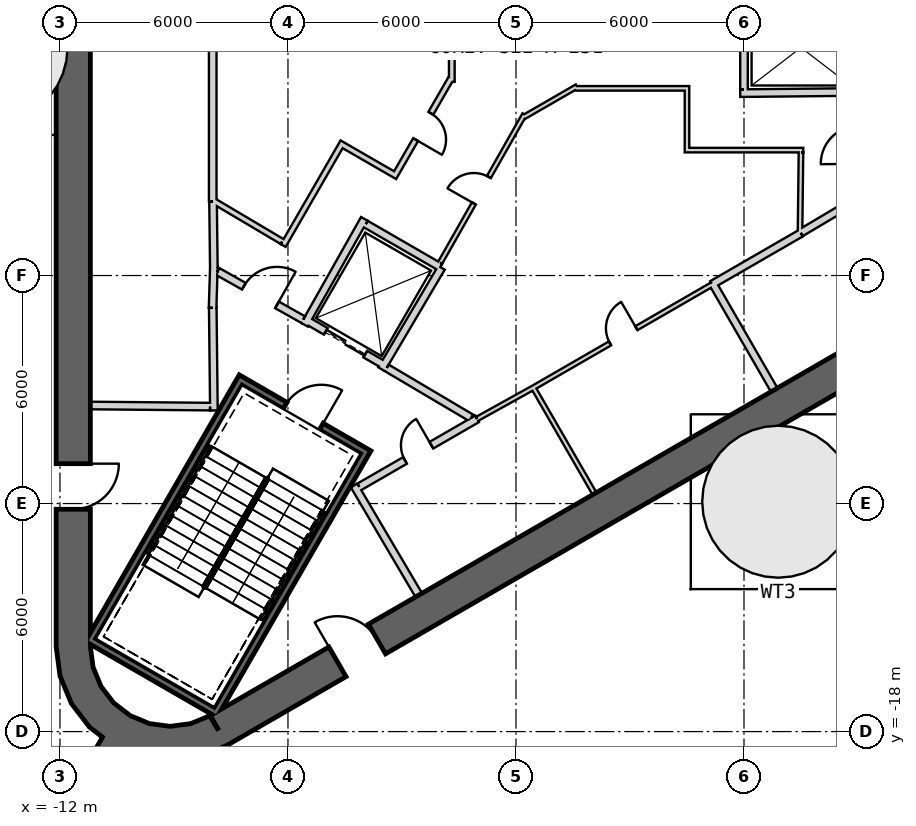
"""IFC4 building model, lengths in metres.
Left out: names, types, materials, properties, quantities, classifications, styles, units other than length and angle.
Written with IfcOpenShell. Run it as: python <this file> out.ifc"""

import sys

from ifc_helpers import new_model, si_unit, direction, frame, frame_2d, origin, place, context, subcontext, project, spatial, polyline, rectangle, outline, extrude, element, fill, save


model = new_model("IFC4")
c1 = context("Model", 3, precision=1e-05, world=origin(), true_north=direction((0.0, 1.0)))
c2 = subcontext(c1, "Body", "Model", "MODEL_VIEW")
j1 = project(units=[si_unit("LENGTHUNIT", "METRE"), si_unit("PLANEANGLEUNIT", "RADIAN")], contexts=[c1])
p1 = place(None, origin())
s1 = spatial("IfcSite", under=j1, at=p1, CompositionType="ELEMENT")
p2 = place(p1, origin())
s2 = spatial("IfcBuilding", under=s1, at=p2, CompositionType="ELEMENT")
p3 = place(p2, frame((0.0, 0.0, 283.7)))
s3 = spatial("IfcBuildingStorey", under=s2, at=p3, CompositionType="ELEMENT", Elevation=283.7)
p4 = place(p3, frame((-11.65, 15.762, 0.0), z_axis=(0.0, 0.0, 1.0), x_axis=(0.0, -1.0, 0.0)))
e1 = element("IfcWall", 1, at=p4, inside=s3, PredefinedType="SHEAR", context=c2, shape_type="SweptSolid", body=[
    extrude(rectangle(XDim=31.523, YDim=0.9, at=frame_2d((15.762, 0.0))), origin(), (0.0, 0.0, 1.0), 9.0),
])
p5 = place(p4, frame((3.612, 0.0, 0.0)))
e2 = element("IfcOpeningElement", 2, at=p5, cuts=e1, PredefinedType="OPENING", context=c2, shape_type="SweptSolid", body=[
    extrude(rectangle(XDim=1.2, YDim=2.4, at=frame_2d((0.6, 1.2))), frame((0.0, 0.46, 0.0), z_axis=(0.0, -1.0, 0.0), x_axis=(1.0, 0.0, 0.0)), (0.0, 0.0, 1.0), 0.92),
])
p6 = place(p4, frame((26.712, 0.0, 0.0)))
e3 = element("IfcOpeningElement", 3, at=p6, cuts=e1, PredefinedType="OPENING", context=c2, shape_type="SweptSolid", body=[
    extrude(rectangle(XDim=1.2, YDim=2.4, at=frame_2d((0.6, 1.2))), frame((0.0, 0.46, 0.0), z_axis=(0.0, -1.0, 0.0), x_axis=(1.0, 0.0, 0.0)), (0.0, 0.0, 1.0), 0.92),
])
p7 = place(p3, frame((-7.825, -17.97, 0.0), z_axis=(0.0, 0.0, 1.0), x_axis=(0.866028369851, 0.499994862586, 0.0)))
e4 = element("IfcWall", 4, at=p7, inside=s3, PredefinedType="SHEAR", context=c2, shape_type="SweptSolid", body=[
    extrude(rectangle(XDim=31.523, YDim=0.9, at=frame_2d((15.762, 0.0))), origin(), (0.0, 0.0, 1.0), 9.0),
])
p8 = place(p7, frame((26.712, 0.0, 0.0)))
e5 = element("IfcOpeningElement", 5, at=p8, cuts=e4, PredefinedType="OPENING", context=c2, shape_type="SweptSolid", body=[
    extrude(rectangle(XDim=1.2, YDim=2.4, at=frame_2d((0.6, 1.2))), frame((0.0, 0.46, 0.0), z_axis=(0.0, -1.0, 0.0), x_axis=(1.0, 0.0, 0.0)), (0.0, 0.0, 1.0), 0.92),
])
p9 = place(p7, frame((3.612, 0.0, 0.0)))
e6 = element("IfcOpeningElement", 6, at=p9, cuts=e4, PredefinedType="OPENING", context=c2, shape_type="SweptSolid", body=[
    extrude(rectangle(XDim=1.2, YDim=2.4, at=frame_2d((0.6, 1.2))), frame((0.0, 0.46, 0.0), z_axis=(0.0, -1.0, 0.0), x_axis=(1.0, 0.0, 0.0)), (0.0, 0.0, 1.0), 0.92),
])
p10 = place(p3, origin())
e7 = element("IfcWall", 7, at=p10, inside=s3, PredefinedType="SHEAR", context=c2, shape_type="SweptSolid", body=[
    extrude(outline(polyline([(-12.1, -15.762), (-11.998, -16.538), (-11.698, -17.262), (-11.221, -17.883), (-10.6, -18.36), (-9.876, -18.659), (-9.1, -18.762), (-8.323, -18.659), (-7.6, -18.36), (-8.05, -17.58), (-8.556, -17.79), (-9.1, -17.862), (-9.644, -17.79), (-10.15, -17.58), (-10.585, -17.247), (-10.919, -16.812), (-11.128, -16.305), (-11.2, -15.762), (-12.1, -15.762)])), origin(), (0.0, 0.0, 1.0), 9.0),
])
p11 = place(p3, frame((-10.575, -18.316, 0.0), z_axis=(0.0, 0.0, 1.0), x_axis=(-0.500007350791, -0.866021159762, 0.0)))
e8 = element("IfcWall", 8, at=p11, inside=s3, PredefinedType="SHEAR", context=c2, shape_type="SweptSolid", body=[
    extrude(rectangle(XDim=9.965, YDim=0.7, at=frame_2d((4.982, 0.0))), origin(), (0.0, 0.0, 1.0), 9.0),
])
p12 = place(p11, frame((2.05, 0.0, 0.0)))
e9 = element("IfcOpeningElement", 9, at=p12, cuts=e8, PredefinedType="OPENING", context=c2, shape_type="SweptSolid", body=[
    extrude(rectangle(XDim=1.4, YDim=2.4, at=frame_2d((0.7, 1.2))), frame((0.0, 0.36, 0.0), z_axis=(0.0, -1.0, 0.0), x_axis=(1.0, 0.0, 0.0)), (0.0, 0.0, 1.0), 0.72),
])
p13 = place(p3, frame((-7.98, 4.05, 0.0), z_axis=(0.0, 0.0, 1.0), x_axis=(0.0, -1.0, 0.0)))
e10 = element("IfcWall", 10, at=p13, inside=s3, PredefinedType="PLUMBINGWALL", context=c2, shape_type="SweptSolid", body=[
    extrude(rectangle(XDim=8.1, YDim=0.2, at=frame_2d((4.05, 0.0))), origin(), (0.0, 0.0, 1.0), 8.65),
])
p14 = place(p3, frame((-7.95, -5.772, 0.0), z_axis=(0.0, 0.0, 1.0), x_axis=(-0.030803413295, -0.999525462272, 0.0)))
e11 = element("IfcWall", 11, at=p14, inside=s3, PredefinedType="PLUMBINGWALL", context=c2, shape_type="SweptSolid", body=[
    extrude(rectangle(XDim=1.078, YDim=0.2, at=frame_2d((0.539, 0.0))), origin(), (0.0, 0.0, 1.0), 8.65),
])
p15 = place(p3, frame((-7.971, -4.05, 0.0), z_axis=(0.0, 0.0, 1.0), x_axis=(0.012042535896, -0.999927486035, 0.0)))
e12 = element("IfcWall", 12, at=p15, inside=s3, PredefinedType="PLUMBINGWALL", context=c2, shape_type="SweptSolid", body=[
    extrude(rectangle(XDim=1.845, YDim=0.2, at=frame_2d((0.922, 0.0))), origin(), (0.0, 0.0, 1.0), 8.65),
])
p16 = place(p3, frame((-7.979, -6.85, 0.0), z_axis=(0.0, 0.0, 1.0), x_axis=(0.011121475088, -0.999938154483, 0.0)))
e13 = element("IfcWall", 13, at=p16, inside=s3, PredefinedType="PLUMBINGWALL", context=c2, shape_type="SweptSolid", body=[
    extrude(rectangle(XDim=2.7, YDim=0.2, at=frame_2d((1.35, 0.0))), origin(), (0.0, 0.0, 1.0), 8.65),
])
p17 = place(p3, frame((-8.05, -9.449, 0.0), z_axis=(0.0, 0.0, 1.0), x_axis=(-0.999957467379, 0.009222983926, 0.0)))
e14 = element("IfcWall", 14, at=p17, inside=s3, PredefinedType="PLUMBINGWALL", context=c2, shape_type="SweptSolid", body=[
    extrude(rectangle(XDim=3.15, YDim=0.2, at=frame_2d((1.575, 0.0))), origin(), (0.0, 0.0, 1.0), 8.65),
])
p18 = place(p3, frame((6.795, -9.01, 0.0), z_axis=(0.0, 0.0, 1.0), x_axis=(-0.499984717929, 0.866034226713, 0.0)))
e15 = element("IfcWall", 15, at=p18, inside=s3, PredefinedType="PLUMBINGWALL", context=c2, shape_type="SweptSolid", body=[
    extrude(rectangle(XDim=3.25, YDim=0.2, at=frame_2d((1.625, 0.0))), origin(), (0.0, 0.0, 1.0), 8.65),
])
p19 = place(p3, frame((5.159, -6.236, 0.0), z_axis=(0.0, 0.0, 1.0), x_axis=(0.866036505625, 0.499980770555, 0.0)))
e16 = element("IfcWall", 16, at=p19, inside=s3, PredefinedType="PLUMBINGWALL", context=c2, shape_type="SweptSolid", body=[
    extrude(rectangle(XDim=2.7, YDim=0.2, at=frame_2d((1.35, 0.0))), origin(), (0.0, 0.0, 1.0), 8.65),
])
p20 = place(p3, frame((7.493, -4.878, 0.0), z_axis=(0.0, 0.0, 1.0), x_axis=(0.859981807212, 0.510324691999, 0.0)))
e17 = element("IfcWall", 17, at=p20, inside=s3, PredefinedType="PLUMBINGWALL", context=c2, shape_type="SweptSolid", body=[
    extrude(rectangle(XDim=1.845, YDim=0.2, at=frame_2d((0.922, 0.0))), origin(), (0.0, 0.0, 1.0), 8.65),
])
p21 = place(p3, frame((5.9, -1.201, 0.0), z_axis=(0.0, 0.0, 1.0), x_axis=(0.999950064753, 0.009993397809, 0.0)))
e18 = element("IfcWall", 18, at=p21, inside=s3, PredefinedType="PLUMBINGWALL", context=c2, shape_type="SweptSolid", body=[
    extrude(rectangle(XDim=3.2, YDim=0.2, at=frame_2d((1.6, 0.0))), origin(), (0.0, 0.0, 1.0), 8.65),
])
p22 = place(p3, frame((6.0, -1.1, 0.0), z_axis=(0.0, 0.0, 1.0), x_axis=(0.0, 1.0, 0.0)))
e19 = element("IfcWall", 19, at=p22, inside=s3, PredefinedType="PLUMBINGWALL", context=c2, shape_type="SweptSolid", body=[
    extrude(rectangle(XDim=2.28, YDim=0.2, at=frame_2d((1.14, 0.0))), origin(), (0.0, 0.0, 1.0), 8.65),
])
p23 = place(p3, frame((-3.905, -10.563, -0.4), z_axis=(0.0, 0.0, 1.0), x_axis=(-0.500012932018, -0.866017937352, 0.0)))
e20 = element("IfcWall", 20, at=p23, inside=s3, PredefinedType="SHEAR", context=c2, shape_type="SweptSolid", body=[
    extrude(rectangle(XDim=8.1, YDim=0.2, at=frame_2d((4.05, 0.0))), origin(), (0.0, 0.0, 1.0), 9.05),
])
p24 = place(p3, frame((-11.282, -15.541, -0.4), z_axis=(0.0, 0.0, 1.0), x_axis=(0.866000483506, -0.500043160704, 0.0)))
e21 = element("IfcWall", 21, at=p24, inside=s3, PredefinedType="SHEAR", context=c2, shape_type="SweptSolid", body=[
    extrude(rectangle(XDim=3.8, YDim=0.2, at=frame_2d((1.9, 0.0))), origin(), (0.0, 0.0, 1.0), 9.05),
])
p25 = place(p3, frame((-7.196, -8.663, -0.4), z_axis=(0.0, 0.0, 1.0), x_axis=(-0.499997992926, -0.866026562566, 0.0)))
e22 = element("IfcWall", 22, at=p25, inside=s3, PredefinedType="SHEAR", context=c2, shape_type="SweptSolid", body=[
    extrude(rectangle(XDim=7.9, YDim=0.2, at=frame_2d((3.95, 0.0))), origin(), (0.0, 0.0, 1.0), 9.05),
])
p26 = place(p3, frame((-4.041, -10.599, -0.4), z_axis=(0.0, 0.0, 1.0), x_axis=(-0.866047807691, 0.499961193289, 0.0)))
e23 = element("IfcWall", 23, at=p26, inside=s3, PredefinedType="SHEAR", context=c2, shape_type="SweptSolid", body=[
    extrude(rectangle(XDim=3.6, YDim=0.2, at=frame_2d((1.8, 0.0))), origin(), (0.0, 0.0, 1.0), 9.05),
])
p27 = place(p26, frame((1.25, 0.0, 0.4)))
e24 = element("IfcOpeningElement", 24, at=p27, cuts=e23, PredefinedType="OPENING", context=c2, shape_type="SweptSolid", body=[
    extrude(rectangle(XDim=1.1, YDim=2.1, at=frame_2d((0.55, 1.05))), frame((0.0, 0.11, 0.0), z_axis=(0.0, -1.0, 0.0), x_axis=(1.0, 0.0, 0.0)), (0.0, 0.0, 1.0), 0.22),
])
p28 = place(p3, frame((-3.446, -8.368, 0.0), z_axis=(0.0, 0.0, 1.0), x_axis=(-0.866024647952, 0.500001309137, 0.0)))
e25 = element("IfcWall", 25, at=p28, inside=s3, PredefinedType="PLUMBINGWALL", context=c2, shape_type="SweptSolid", body=[
    extrude(rectangle(XDim=2.4, YDim=0.2, at=frame_2d((1.2, 0.0))), origin(), (0.0, 0.0, 1.0), 8.65),
])
p29 = place(p28, frame((0.6, 0.0, 0.0)))
e26 = element("IfcOpeningElement", 26, at=p29, cuts=e25, PredefinedType="OPENING", context=c2, shape_type="SweptSolid", body=[
    extrude(rectangle(XDim=1.2, YDim=2.4, at=frame_2d((0.6, 1.2))), frame((0.0, 0.11, 0.0), z_axis=(0.0, -1.0, 0.0), x_axis=(1.0, 0.0, 0.0)), (0.0, 0.0, 1.0), 0.22),
])
p30 = place(p3, frame((-1.961, -5.796, 0.0), z_axis=(0.0, 0.0, 1.0), x_axis=(-0.508647062354, -0.860975125052, 0.0)))
e27 = element("IfcWall", 27, at=p30, inside=s3, PredefinedType="PLUMBINGWALL", context=c2, shape_type="SweptSolid", body=[
    extrude(rectangle(XDim=3.1, YDim=0.2, at=frame_2d((1.55, 0.0))), origin(), (0.0, 0.0, 1.0), 8.65),
])
p31 = place(p3, frame((-3.99, -4.509, 0.0), z_axis=(0.0, 0.0, 1.0), x_axis=(-0.491358283181, -0.870957540612, 0.0)))
e28 = element("IfcWall", 28, at=p31, inside=s3, PredefinedType="PLUMBINGWALL", context=c2, shape_type="SweptSolid", body=[
    extrude(rectangle(XDim=3.2, YDim=0.2, at=frame_2d((1.6, 0.0))), origin(), (0.0, 0.0, 1.0), 8.65),
])
p32 = place(p3, frame((-3.953, -4.646, 0.0), z_axis=(0.0, 0.0, 1.0), x_axis=(0.866065302921, -0.4999308863, 0.0)))
e29 = element("IfcWall", 29, at=p32, inside=s3, PredefinedType="PLUMBINGWALL", context=c2, shape_type="SweptSolid", body=[
    extrude(rectangle(XDim=2.264, YDim=0.2, at=frame_2d((1.132, 0.0))), origin(), (0.0, 0.0, 1.0), 8.65),
])
p33 = place(p3, frame((2.067, -11.74, 0.0), z_axis=(0.0, 0.0, 1.0), x_axis=(-0.499984717929, 0.866034226713, 0.0)))
e30 = element("IfcWall", 30, at=p33, inside=s3, PredefinedType="PARTITIONING", context=c2, shape_type="SweptSolid", body=[
    extrude(rectangle(XDim=3.25, YDim=0.12, at=frame_2d((1.625, 0.0))), origin(), (0.0, 0.0, 1.0), 8.65),
])
p34 = place(p3, frame((-4.26, -11.524, 0.0), z_axis=(0.0, 0.0, 1.0), x_axis=(0.507997497166, -0.861358544901, 0.0)))
e31 = element("IfcWall", 31, at=p34, inside=s3, PredefinedType="PARTITIONING", context=c2, shape_type="SweptSolid", body=[
    extrude(rectangle(XDim=3.35, YDim=0.2, at=frame_2d((1.675, 0.0))), origin(), (0.0, 0.0, 1.0), 8.65),
])
p35 = place(p3, frame((-1.024, -9.771, 0.0), z_axis=(0.0, 0.0, 1.0), x_axis=(-0.866029903013, -0.499992207027, 0.0)))
e32 = element("IfcWall", 32, at=p35, inside=s3, PredefinedType="PARTITIONING", context=c2, shape_type="SweptSolid", body=[
    extrude(rectangle(XDim=3.578, YDim=0.2, at=frame_2d((1.789, 0.0))), origin(), (0.0, 0.0, 1.0), 8.65),
])
p36 = place(p35, frame((1.389, 0.0, 0.0)))
e33 = element("IfcOpeningElement", 33, at=p36, cuts=e32, PredefinedType="OPENING", context=c2, shape_type="SweptSolid", body=[
    extrude(rectangle(XDim=0.8, YDim=2.1, at=frame_2d((0.4, 1.05))), frame((0.0, 0.11, 0.0), z_axis=(0.0, -1.0, 0.0), x_axis=(1.0, 0.0, 0.0)), (0.0, 0.0, 1.0), 0.22),
])
p37 = place(p3, frame((-1.023, -9.772, 0.0), z_axis=(0.0, 0.0, 1.0), x_axis=(0.874290944206, 0.485402250592, 0.0)))
e34 = element("IfcWall", 34, at=p37, inside=s3, PredefinedType="PARTITIONING", context=c2, shape_type="SweptSolid", body=[
    extrude(rectangle(XDim=1.723, YDim=0.12, at=frame_2d((0.861, 0.0))), origin(), (0.0, 0.0, 1.0), 8.65),
])
p38 = place(p3, frame((0.483, -8.936, 0.0), z_axis=(0.0, 0.0, 1.0), x_axis=(0.866028230842, 0.499995103361, 0.0)))
e35 = element("IfcWall", 35, at=p38, inside=s3, PredefinedType="PARTITIONING", context=c2, shape_type="SweptSolid", body=[
    extrude(rectangle(XDim=5.4, YDim=0.12, at=frame_2d((2.7, 0.0))), origin(), (0.0, 0.0, 1.0), 8.65),
])
p39 = place(p38, frame((2.3, 0.0, 0.0)))
e36 = element("IfcOpeningElement", 36, at=p39, cuts=e35, PredefinedType="OPENING", context=c2, shape_type="SweptSolid", body=[
    extrude(rectangle(XDim=0.8, YDim=2.1, at=frame_2d((0.4, 1.05))), frame((0.0, 0.07, 0.0), z_axis=(0.0, -1.0, 0.0), x_axis=(1.0, 0.0, 0.0)), (0.0, 0.0, 1.0), 0.14),
])
p40 = place(p3, frame((-3.401, -8.43, 0.0), z_axis=(0.0, 0.0, 1.0), x_axis=(0.860630814782, -0.509229418482, 0.0)))
e37 = element("IfcWall", 37, at=p40, inside=s3, PredefinedType="PARTITIONING", context=c2, shape_type="SweptSolid", body=[
    extrude(rectangle(XDim=2.582, YDim=0.2, at=frame_2d((1.291, 0.0))), origin(), (0.0, 0.0, 1.0), 8.65),
])
p41 = place(p3, frame((-7.849, -5.894, 0.0), z_axis=(0.0, 0.0, 1.0), x_axis=(0.871363259478, -0.490638431059, 0.0)))
e38 = element("IfcWall", 38, at=p41, inside=s3, PredefinedType="PARTITIONING", context=c2, shape_type="SweptSolid", body=[
    extrude(rectangle(XDim=2.581, YDim=0.2, at=frame_2d((1.291, 0.0))), origin(), (0.0, 0.0, 1.0), 8.65),
])
p42 = place(p41, frame((0.791, 0.0, 0.0)))
e39 = element("IfcOpeningElement", 39, at=p42, cuts=e38, PredefinedType="OPENING", context=c2, shape_type="SweptSolid", body=[
    extrude(rectangle(XDim=1.0, YDim=2.1, at=frame_2d((0.5, 1.05))), frame((0.0, 0.11, 0.0), z_axis=(0.0, -1.0, 0.0), x_axis=(1.0, 0.0, 0.0)), (0.0, 0.0, 1.0), 0.22),
])
p43 = place(p3, frame((0.224, -1.761, 0.0), z_axis=(0.0, 0.0, 1.0), x_axis=(-0.494327216836, -0.869275907118, 0.0)))
e40 = element("IfcWall", 40, at=p43, inside=s3, PredefinedType="PARTITIONING", context=c2, shape_type="SweptSolid", body=[
    extrude(rectangle(XDim=4.487, YDim=0.12, at=frame_2d((2.244, 0.0))), origin(), (0.0, 0.0, 1.0), 8.65),
])
p44 = place(p43, frame((1.895, 0.0, 0.0)))
e41 = element("IfcOpeningElement", 41, at=p44, cuts=e40, PredefinedType="OPENING", context=c2, shape_type="SweptSolid", body=[
    extrude(rectangle(XDim=0.8, YDim=2.1, at=frame_2d((0.4, 1.05))), frame((0.0, 0.07, 0.0), z_axis=(0.0, -1.0, 0.0), x_axis=(1.0, 0.0, 0.0)), (0.0, 0.0, 1.0), 0.14),
])
p45 = place(p3, frame((1.605, -1.023, 0.0), z_axis=(0.0, 0.0, 1.0), x_axis=(-0.866001581989, -0.50004125829, 0.0)))
e42 = element("IfcWall", 42, at=p45, inside=s3, PredefinedType="PARTITIONING", context=c2, shape_type="SweptSolid", body=[
    extrude(rectangle(XDim=1.635, YDim=0.12, at=frame_2d((0.817, 0.0))), origin(), (0.0, 0.0, 1.0), 8.65),
])
p46 = place(p3, frame((4.56, -1.075, 0.0), z_axis=(0.0, 0.0, 1.0), x_axis=(-1.0, 0.0, 0.0)))
e43 = element("IfcWall", 43, at=p46, inside=s3, PredefinedType="PARTITIONING", context=c2, shape_type="SweptSolid", body=[
    extrude(rectangle(XDim=3.026, YDim=0.12, at=frame_2d((1.513, 0.0))), origin(), (0.0, 0.0, 1.0), 8.65),
])
p47 = place(p3, frame((4.5, -2.76, 0.0), z_axis=(0.0, 0.0, 1.0), x_axis=(0.0, 1.0, 0.0)))
e44 = element("IfcWall", 44, at=p47, inside=s3, PredefinedType="PARTITIONING", context=c2, shape_type="SweptSolid", body=[
    extrude(rectangle(XDim=1.625, YDim=0.12, at=frame_2d((0.812, 0.0))), origin(), (0.0, 0.0, 1.0), 8.65),
])
p48 = place(p3, frame((7.56, -2.7, 0.0), z_axis=(0.0, 0.0, 1.0), x_axis=(-1.0, 0.0, 0.0)))
e45 = element("IfcWall", 45, at=p48, inside=s3, PredefinedType="PARTITIONING", context=c2, shape_type="SweptSolid", body=[
    extrude(rectangle(XDim=3.0, YDim=0.12, at=frame_2d((1.5, 0.0))), origin(), (0.0, 0.0, 1.0), 8.65),
])
p49 = place(p3, frame((7.475, -4.865, 0.0), z_axis=(0.0, 0.0, 1.0), x_axis=(0.011716133148, 0.999931363757, 0.0)))
e46 = element("IfcWall", 46, at=p49, inside=s3, PredefinedType="PARTITIONING", context=c2, shape_type="SweptSolid", body=[
    extrude(rectangle(XDim=2.105, YDim=0.12, at=frame_2d((1.052, 0.0))), origin(), (0.0, 0.0, 1.0), 8.65),
])
p50 = place(p3, frame((-1.689, -0.905, 0.0), z_axis=(0.0, 0.0, 1.0), x_axis=(0.0, 1.0, 0.0)))
e47 = element("IfcWall", 47, at=p50, inside=s3, PredefinedType="PLUMBINGWALL", context=c2, shape_type="SweptSolid", body=[
    extrude(rectangle(XDim=1.656, YDim=0.15, at=frame_2d((0.828, 0.0))), origin(), (0.0, 0.0, 1.0), 8.65),
])
p51 = place(p3, frame((-3.219, -3.425, 0.0), z_axis=(0.0, 0.0, 1.0), x_axis=(0.499996236806, 0.866027576455, 0.0)))
e48 = element("IfcWall", 48, at=p51, inside=s3, PredefinedType="PLUMBINGWALL", context=c2, shape_type="SweptSolid", body=[
    extrude(rectangle(XDim=3.036, YDim=0.15, at=frame_2d((1.518, 0.0))), origin(), (0.0, 0.0, 1.0), 8.65),
])
p52 = place(p51, frame((1.156, 0.0, 0.0)))
e49 = element("IfcOpeningElement", 49, at=p52, cuts=e48, PredefinedType="OPENING", context=c2, shape_type="SweptSolid", body=[
    extrude(rectangle(XDim=0.8, YDim=2.1, at=frame_2d((0.4, 1.05))), frame((0.0, 0.085, 0.0), z_axis=(0.0, -1.0, 0.0), x_axis=(1.0, 0.0, 0.0)), (0.0, 0.0, 1.0), 0.17),
])
p53 = place(p3, frame((-4.653, -2.51, 0.0), z_axis=(0.0, 0.0, 1.0), x_axis=(0.866053003207, -0.499952193351, 0.0)))
e50 = element("IfcWall", 50, at=p53, inside=s3, PredefinedType="PLUMBINGWALL", context=c2, shape_type="SweptSolid", body=[
    extrude(rectangle(XDim=1.625, YDim=0.15, at=frame_2d((0.812, 0.0))), origin(), (0.0, 0.0, 1.0), 8.65),
])
p54 = place(p3, frame((-6.126, -5.21, 0.0), z_axis=(0.0, 0.0, 1.0), x_axis=(0.499990139034, 0.866031096941, 0.0)))
e51 = element("IfcWall", 51, at=p54, inside=s3, PredefinedType="PLUMBINGWALL", context=c2, shape_type="SweptSolid", body=[
    extrude(rectangle(XDim=3.0, YDim=0.15, at=frame_2d((1.5, 0.0))), origin(), (0.0, 0.0, 1.0), 8.65),
])
p55 = place(p3, frame((-7.95, -4.041, 0.0), z_axis=(0.0, 0.0, 1.0), x_axis=(0.860090281069, -0.510141851263, 0.0)))
e52 = element("IfcWall", 52, at=p55, inside=s3, PredefinedType="PLUMBINGWALL", context=c2, shape_type="SweptSolid", body=[
    extrude(rectangle(XDim=2.089, YDim=0.15, at=frame_2d((1.045, 0.0))), origin(), (0.0, 0.0, 1.0), 8.65),
])
p56 = place(p27, origin())
e53 = element("IfcDoor", 53, at=p56, inside=s3, OperationType="SINGLE_SWING_LEFT", PredefinedType="USERDEFINED", context=c2, shape_type="SweptSolid", body=[
    extrude(rectangle(XDim=1.1, YDim=2.1, at=frame_2d((0.55, 1.05))), frame((0.0, 0.025, 0.0), z_axis=(0.0, -1.0, 0.0), x_axis=(1.0, 0.0, 0.0)), (0.0, 0.0, 1.0), 0.05),
])
fill(e24, e53)
p57 = place(p42, origin())
e54 = element("IfcDoor", 54, at=p57, inside=s3, OperationType="SINGLE_SWING_RIGHT", PredefinedType="USERDEFINED", context=c2, shape_type="SweptSolid", body=[
    extrude(rectangle(XDim=1.0, YDim=2.1, at=frame_2d((0.5, 1.05))), frame((0.0, 0.025, 0.0), z_axis=(0.0, -1.0, 0.0), x_axis=(1.0, 0.0, 0.0)), (0.0, 0.0, 1.0), 0.05),
])
fill(e39, e54)
p58 = place(p29, origin())
e55 = element("IfcDoor", 55, at=p58, inside=s3, OperationType="SLIDING_TO_LEFT", PredefinedType="USERDEFINED", context=c2, shape_type="SweptSolid", body=[
    extrude(rectangle(XDim=1.2, YDim=2.4, at=frame_2d((0.6, 1.2))), frame((0.0, 0.025, 0.0), z_axis=(0.0, -1.0, 0.0), x_axis=(1.0, 0.0, 0.0)), (0.0, 0.0, 1.0), 0.05),
])
fill(e26, e55)
p59 = place(p44, origin())
e56 = element("IfcDoor", 56, at=p59, inside=s3, OperationType="SINGLE_SWING_RIGHT", PredefinedType="USERDEFINED", context=c2, shape_type="SweptSolid", body=[
    extrude(rectangle(XDim=0.8, YDim=2.1, at=frame_2d((0.4, 1.05))), frame((0.0, 0.025, 0.0), z_axis=(0.0, -1.0, 0.0), x_axis=(1.0, 0.0, 0.0)), (0.0, 0.0, 1.0), 0.05),
])
fill(e41, e56)
p60 = place(p52, origin())
e57 = element("IfcDoor", 57, at=p60, inside=s3, OperationType="SINGLE_SWING_LEFT", PredefinedType="USERDEFINED", context=c2, shape_type="SweptSolid", body=[
    extrude(rectangle(XDim=0.8, YDim=2.1, at=frame_2d((0.4, 1.05))), frame((0.0, 0.025, 0.0), z_axis=(0.0, -1.0, 0.0), x_axis=(1.0, 0.0, 0.0)), (0.0, 0.0, 1.0), 0.05),
])
fill(e49, e57)
p61 = place(p36, origin())
e58 = element("IfcDoor", 58, at=p61, inside=s3, OperationType="SINGLE_SWING_LEFT", PredefinedType="USERDEFINED", context=c2, shape_type="SweptSolid", body=[
    extrude(rectangle(XDim=0.8, YDim=2.1, at=frame_2d((0.4, 1.05))), frame((0.0, 0.025, 0.0), z_axis=(0.0, -1.0, 0.0), x_axis=(1.0, 0.0, 0.0)), (0.0, 0.0, 1.0), 0.05),
])
fill(e33, e58)
p62 = place(p39, origin())
e59 = element("IfcDoor", 59, at=p62, inside=s3, OperationType="SINGLE_SWING_RIGHT", PredefinedType="USERDEFINED", context=c2, shape_type="SweptSolid", body=[
    extrude(rectangle(XDim=0.8, YDim=2.1, at=frame_2d((0.4, 1.05))), frame((0.0, 0.025, 0.0), z_axis=(0.0, -1.0, 0.0), x_axis=(1.0, 0.0, 0.0)), (0.0, 0.0, 1.0), 0.05),
])
fill(e36, e59)
p63 = place(p6, origin())
e60 = element("IfcDoor", 60, at=p63, inside=s3, OperationType="SINGLE_SWING_LEFT", PredefinedType="USERDEFINED", context=c2, shape_type="SweptSolid", body=[
    extrude(rectangle(XDim=1.2, YDim=2.4, at=frame_2d((0.6, 1.2))), frame((0.0, 0.025, 0.0), z_axis=(0.0, -1.0, 0.0), x_axis=(1.0, 0.0, 0.0)), (0.0, 0.0, 1.0), 0.05),
])
fill(e3, e60)
p64 = place(p9, origin())
e61 = element("IfcDoor", 61, at=p64, inside=s3, OperationType="SINGLE_SWING_LEFT", PredefinedType="USERDEFINED", context=c2, shape_type="SweptSolid", body=[
    extrude(rectangle(XDim=1.2, YDim=2.4, at=frame_2d((0.6, 1.2))), frame((0.0, 0.025, 0.0), z_axis=(0.0, -1.0, 0.0), x_axis=(1.0, 0.0, 0.0)), (0.0, 0.0, 1.0), 0.05),
])
fill(e6, e61)
save(model, sys.argv[1])
